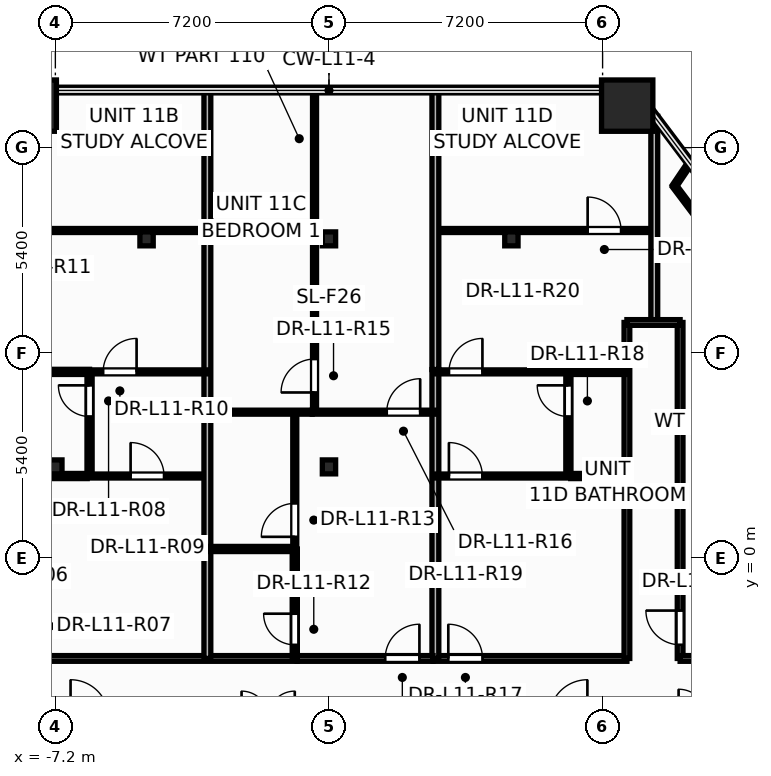
"""IFC4 building model, lengths in metres.
Left out: names, types, materials, properties, quantities, classifications, styles, units other than length and angle.
Written with IfcOpenShell. Run it as: python <this file> out.ifc"""

import sys

from ifc_helpers import new_model, si_unit, direction, frame, frame_2d, origin, origin_2d, place, context, subcontext, project, spatial, rectangle, hollow_rectangle, i_section, extrude, element, fill, save


model = new_model("IFC4")
c1 = context("Model", 3, precision=1e-05, world=origin(), true_north=direction((0.0, 1.0)))
c2 = subcontext(c1, "Body", "Model", "MODEL_VIEW")
j1 = project(units=[si_unit("LENGTHUNIT", "METRE"), si_unit("PLANEANGLEUNIT", "RADIAN")], contexts=[c1])
p1 = place(None, origin())
s1 = spatial("IfcSite", under=j1, at=p1, CompositionType="ELEMENT")
p2 = place(p1, origin())
s2 = spatial("IfcBuilding", under=s1, at=p2, CompositionType="ELEMENT")
p3 = place(p2, frame((0.0, 0.0, 45.9)))
s3 = spatial("IfcBuildingStorey", under=s2, at=p3, CompositionType="ELEMENT", Elevation=45.9)
for number, where, z_axis, x_axis in (
    (1, (7.847, 11.906, 0.0), (0.0, 0.0, 1.0), (1.0, 0.0, 0.0)),
    (2, (-7.847, 11.906, 0.0), (0.0, 0.0, 1.0), (1.0, 0.0, 0.0)),
):
    element("IfcColumn", number, at=place(p3, frame(where, z_axis=z_axis, x_axis=x_axis)), inside=s3, PredefinedType="COLUMN", context=c2, shape_type="SweptSolid", body=[
        extrude(hollow_rectangle(XDim=1.35, YDim=1.35, WallThickness=0.065, at=origin_2d()), origin(), (0.0, 0.0, 1.0), 3.6),
    ])
for number, where, z_axis, x_axis in (
    (3, (-7.2, 2.4, 0.0), (0.0, 0.0, 1.0), (1.0, 0.0, 0.0)),
    (4, (0.0, 2.4, 0.0), (0.0, 0.0, 1.0), (1.0, 0.0, 0.0)),
    (5, (7.2, 2.4, 0.0), (0.0, 0.0, 1.0), (1.0, 0.0, 0.0)),
    (6, (-4.8, 8.4, 0.0), (0.0, 0.0, 1.0), (1.0, 0.0, 0.0)),
    (7, (0.0, 8.4, 0.0), (0.0, 0.0, 1.0), (1.0, 0.0, 0.0)),
    (8, (4.8, 8.4, 0.0), (0.0, 0.0, 1.0), (1.0, 0.0, 0.0)),
):
    element("IfcColumn", number, at=place(p3, frame(where, z_axis=z_axis, x_axis=x_axis)), inside=s3, PredefinedType="COLUMN", context=c2, shape_type="SweptSolid", body=[
        extrude(i_section(OverallWidth=0.35, OverallDepth=0.367, WebThickness=0.025, FlangeThickness=0.032, at=origin_2d()), origin(), (0.0, 0.0, 1.0), 3.6),
    ])
p4 = place(p3, frame((9.24, -2.64, 0.0), z_axis=(0.0, 0.0, 1.0), x_axis=(0.0, 1.0, 0.0)))
e9 = element("IfcWall", 9, at=p4, inside=s3, PredefinedType="PARTITIONING", context=c2, shape_type="SweptSolid", body=[
    extrude(rectangle(XDim=8.84, YDim=0.15, at=frame_2d((4.42, 0.0))), origin(), (0.0, 0.0, 1.0), 2.509),
])
p5 = place(p4, frame((0.359, 0.0, 0.0)))
e10 = element("IfcOpeningElement", 10, at=p5, cuts=e9, PredefinedType="OPENING", context=c2, shape_type="SweptSolid", body=[
    extrude(rectangle(XDim=0.906, YDim=2.104, at=frame_2d((0.45, 1.052))), frame((0.0, 0.085, 0.0), z_axis=(0.0, -1.0, 0.0), x_axis=(1.0, 0.0, 0.0)), (0.0, 0.0, 1.0), 0.17),
])
p6 = place(p3, frame((-0.38, 3.84, 0.0), z_axis=(0.0, 0.0, 1.0), x_axis=(0.0, 1.0, 0.0)))
e11 = element("IfcWall", 11, at=p6, inside=s3, PredefinedType="PARTITIONING", context=c2, shape_type="SweptSolid", body=[
    extrude(rectangle(XDim=8.466, YDim=0.105, at=frame_2d((4.233, 0.0))), origin(), (0.0, 0.0, 1.0), 2.509),
])
p7 = place(p6, frame((0.518, 0.0, 0.0)))
e12 = element("IfcOpeningElement", 12, at=p7, cuts=e11, PredefinedType="OPENING", context=c2, shape_type="SweptSolid", body=[
    extrude(rectangle(XDim=0.886, YDim=2.104, at=frame_2d((0.44, 1.052))), frame((0.0, 0.062, 0.0), z_axis=(0.0, -1.0, 0.0), x_axis=(1.0, 0.0, 0.0)), (0.0, 0.0, 1.0), 0.125),
])
p8 = place(p3, frame((2.8, 8.62, 0.0), z_axis=(0.0, 0.0, 1.0), x_axis=(1.0, 0.0, 0.0)))
e13 = element("IfcWall", 13, at=p8, inside=s3, PredefinedType="PARTITIONING", context=c2, shape_type="SweptSolid", body=[
    extrude(rectangle(XDim=5.76, YDim=0.105, at=frame_2d((2.88, 0.0))), origin(), (0.0, 0.0, 1.0), 2.509),
])
p9 = place(p8, frame((4.007, 0.0, 0.0)))
e14 = element("IfcOpeningElement", 14, at=p9, cuts=e13, PredefinedType="OPENING", context=c2, shape_type="SweptSolid", body=[
    extrude(rectangle(XDim=0.886, YDim=2.104, at=frame_2d((0.44, 1.052))), frame((0.0, 0.062, 0.0), z_axis=(0.0, -1.0, 0.0), x_axis=(1.0, 0.0, 0.0)), (0.0, 0.0, 1.0), 0.125),
])
p10 = place(p3, frame((9.24, -2.64, 0.0), z_axis=(0.0, 0.0, 1.0), x_axis=(1.0, 0.0, 0.0)))
e15 = element("IfcWall", 15, at=p10, inside=s3, PredefinedType="PARTITIONING", context=c2, shape_type="SweptSolid", body=[
    extrude(rectangle(XDim=5.4, YDim=0.15, at=frame_2d((2.7, 0.0))), origin(), (0.0, 0.0, 1.0), 3.35),
])
p11 = place(p3, frame((-8.56, 8.62, 0.0), z_axis=(0.0, 0.0, 1.0), x_axis=(1.0, 0.0, 0.0)))
e16 = element("IfcWall", 16, at=p11, inside=s3, PredefinedType="PARTITIONING", context=c2, shape_type="SweptSolid", body=[
    extrude(rectangle(XDim=5.36, YDim=0.105, at=frame_2d((2.68, 0.0))), origin(), (0.0, 0.0, 1.0), 2.509),
])
p12 = place(p11, frame((0.358, 0.0, 0.0)))
e17 = element("IfcOpeningElement", 17, at=p12, cuts=e16, PredefinedType="OPENING", context=c2, shape_type="SweptSolid", body=[
    extrude(rectangle(XDim=0.886, YDim=2.104, at=frame_2d((0.44, 1.052))), frame((0.0, 0.062, 0.0), z_axis=(0.0, -1.0, 0.0), x_axis=(1.0, 0.0, 0.0)), (0.0, 0.0, 1.0), 0.125),
])
p13 = place(p3, frame((2.74, -2.64, 0.0), z_axis=(0.0, 0.0, 1.0), x_axis=(1.0, 0.0, 0.0)))
e18 = element("IfcWall", 18, at=p13, inside=s3, PredefinedType="PARTITIONING", context=c2, shape_type="SweptSolid", body=[
    extrude(rectangle(XDim=5.1, YDim=0.15, at=frame_2d((2.55, 0.0))), origin(), (0.0, 0.0, 1.0), 2.325),
])
p14 = place(p13, frame((0.4, 0.0, 0.0)))
e19 = element("IfcOpeningElement", 19, at=p14, cuts=e18, PredefinedType="OPENING", context=c2, shape_type="SweptSolid", body=[
    extrude(rectangle(XDim=0.906, YDim=2.104, at=frame_2d((0.45, 1.052))), frame((0.0, 0.085, 0.0), z_axis=(0.0, -1.0, 0.0), x_axis=(1.0, 0.0, 0.0)), (0.0, 0.0, 1.0), 0.17),
])
p15 = place(p3, frame((7.84, -2.64, 0.0), z_axis=(0.0, 0.0, 1.0), x_axis=(0.0, 1.0, 0.0)))
e20 = element("IfcWall", 20, at=p15, inside=s3, PredefinedType="PARTITIONING", context=c2, shape_type="SweptSolid", body=[
    extrude(rectangle(XDim=8.84, YDim=0.15, at=frame_2d((4.42, 0.0))), origin(), (0.0, 0.0, 1.0), 2.509),
])
p16 = place(p3, frame((2.8, -2.64, 0.0), z_axis=(0.0, 0.0, 1.0), x_axis=(0.0, 1.0, 0.0)))
e21 = element("IfcWall", 21, at=p16, inside=s3, PredefinedType="PARTITIONING", context=c2, shape_type="SweptSolid", body=[
    extrude(rectangle(XDim=7.6, YDim=0.18, at=frame_2d((3.8, 0.0))), origin(), (0.0, 0.0, 1.0), 2.325),
])
p17 = place(p3, frame((-7.84, -2.64, 0.0), z_axis=(0.0, 0.0, 1.0), x_axis=(1.0, 0.0, 0.0)))
e22 = element("IfcWall", 22, at=p17, inside=s3, PredefinedType="PARTITIONING", context=c2, shape_type="SweptSolid", body=[
    extrude(rectangle(XDim=7.0, YDim=0.15, at=frame_2d((3.5, 0.0))), origin(), (0.0, 0.0, 1.0), 2.325),
])
p18 = place(p3, frame((2.8, 4.962, 0.0), z_axis=(0.0, 0.0, 1.0), x_axis=(0.0, 1.0, 0.0)))
e23 = element("IfcWall", 23, at=p18, inside=s3, PredefinedType="PARTITIONING", context=c2, shape_type="SweptSolid", body=[
    extrude(rectangle(XDim=7.344, YDim=0.18, at=frame_2d((3.672, 0.0))), origin(), (0.0, 0.0, 1.0), 2.509),
])
p19 = place(p3, frame((-0.838, -2.64, 0.0), z_axis=(0.0, 0.0, 1.0), x_axis=(1.0, 0.0, 0.0)))
e24 = element("IfcWall", 24, at=p19, inside=s3, PredefinedType="PARTITIONING", context=c2, shape_type="SweptSolid", body=[
    extrude(rectangle(XDim=3.576, YDim=0.15, at=frame_2d((1.788, 0.0))), origin(), (0.0, 0.0, 1.0), 2.325),
])
p20 = place(p19, frame((2.318, 0.0, 0.0)))
e25 = element("IfcOpeningElement", 25, at=p20, cuts=e24, PredefinedType="OPENING", context=c2, shape_type="SweptSolid", body=[
    extrude(rectangle(XDim=0.906, YDim=2.104, at=frame_2d((0.45, 1.052))), frame((0.0, 0.085, 0.0), z_axis=(0.0, -1.0, 0.0), x_axis=(1.0, 0.0, 0.0)), (0.0, 0.0, 1.0), 0.17),
])
p21 = place(p3, frame((-3.2, 3.8, 0.0), z_axis=(0.0, 0.0, 1.0), x_axis=(0.0, 1.0, 0.0)))
e26 = element("IfcWall", 26, at=p21, inside=s3, PredefinedType="PARTITIONING", context=c2, shape_type="SweptSolid", body=[
    extrude(rectangle(XDim=8.506, YDim=0.18, at=frame_2d((4.253, 0.0))), origin(), (0.0, 0.0, 1.0), 2.509),
])
p22 = place(p3, frame((-0.9, 0.24, 0.0), z_axis=(0.0, 0.0, 1.0), x_axis=(0.0, 1.0, 0.0)))
e27 = element("IfcWall", 27, at=p22, inside=s3, PredefinedType="PARTITIONING", context=c2, shape_type="SweptSolid", body=[
    extrude(rectangle(XDim=3.6, YDim=0.105, at=frame_2d((1.8, 0.0))), origin(), (0.0, 0.0, 1.0), 2.325),
])
p23 = place(p22, frame((0.32, 0.0, 0.0)))
e28 = element("IfcOpeningElement", 28, at=p23, cuts=e27, PredefinedType="OPENING", context=c2, shape_type="SweptSolid", body=[
    extrude(rectangle(XDim=0.886, YDim=2.104, at=frame_2d((0.44, 1.052))), frame((0.0, 0.062, 0.0), z_axis=(0.0, -1.0, 0.0), x_axis=(1.0, 0.0, 0.0)), (0.0, 0.0, 1.0), 0.125),
])
p24 = place(p3, frame((2.8, 2.16, 0.0), z_axis=(0.0, 0.0, 1.0), x_axis=(1.0, 0.0, 0.0)))
e29 = element("IfcWall", 29, at=p24, inside=s3, PredefinedType="PARTITIONING", context=c2, shape_type="SweptSolid", body=[
    extrude(rectangle(XDim=3.56, YDim=0.105, at=frame_2d((1.78, 0.0))), origin(), (0.0, 0.0, 1.0), 2.325),
])
p25 = place(p24, frame((0.356, 0.0, 0.0)))
e30 = element("IfcOpeningElement", 30, at=p25, cuts=e29, PredefinedType="OPENING", context=c2, shape_type="SweptSolid", body=[
    extrude(rectangle(XDim=0.886, YDim=2.104, at=frame_2d((0.44, 1.052))), frame((0.0, 0.062, 0.0), z_axis=(0.0, -1.0, 0.0), x_axis=(1.0, 0.0, 0.0)), (0.0, 0.0, 1.0), 0.125),
])
p26 = place(p3, frame((2.8, 4.9, 0.0), z_axis=(0.0, 0.0, 1.0), x_axis=(1.0, 0.0, 0.0)))
e31 = element("IfcWall", 31, at=p26, inside=s3, PredefinedType="PARTITIONING", context=c2, shape_type="SweptSolid", body=[
    extrude(rectangle(XDim=3.5, YDim=0.105, at=frame_2d((1.75, 0.0))), origin(), (0.0, 0.0, 1.0), 2.509),
])
p27 = place(p26, frame((0.358, 0.0, 0.0)))
e32 = element("IfcOpeningElement", 32, at=p27, cuts=e31, PredefinedType="OPENING", context=c2, shape_type="SweptSolid", body=[
    extrude(rectangle(XDim=0.886, YDim=2.104, at=frame_2d((0.44, 1.052))), frame((0.0, 0.062, 0.0), z_axis=(0.0, -1.0, 0.0), x_axis=(1.0, 0.0, 0.0)), (0.0, 0.0, 1.0), 0.125),
])
p28 = place(p3, frame((-0.44, 3.84, 0.0), z_axis=(0.0, 0.0, 1.0), x_axis=(1.0, 0.0, 0.0)))
e33 = element("IfcWall", 33, at=p28, inside=s3, PredefinedType="PARTITIONING", context=c2, shape_type="SweptSolid", body=[
    extrude(rectangle(XDim=3.24, YDim=0.105, at=frame_2d((1.62, 0.0))), origin(), (0.0, 0.0, 1.0), 2.325),
])
p29 = place(p28, frame((1.96, 0.0, 0.0)))
e34 = element("IfcOpeningElement", 34, at=p29, cuts=e33, PredefinedType="OPENING", context=c2, shape_type="SweptSolid", body=[
    extrude(rectangle(XDim=0.886, YDim=2.104, at=frame_2d((0.44, 1.052))), frame((0.0, 0.062, 0.0), z_axis=(0.0, -1.0, 0.0), x_axis=(1.0, 0.0, 0.0)), (0.0, 0.0, 1.0), 0.125),
])
p30 = place(p3, frame((-6.36, 2.16, 0.0), z_axis=(0.0, 0.0, 1.0), x_axis=(1.0, 0.0, 0.0)))
e35 = element("IfcWall", 35, at=p30, inside=s3, PredefinedType="PARTITIONING", context=c2, shape_type="SweptSolid", body=[
    extrude(rectangle(XDim=3.16, YDim=0.105, at=frame_2d((1.58, 0.0))), origin(), (0.0, 0.0, 1.0), 2.325),
])
p31 = place(p30, frame((1.14, 0.0, 0.0)))
e36 = element("IfcOpeningElement", 36, at=p31, cuts=e35, PredefinedType="OPENING", context=c2, shape_type="SweptSolid", body=[
    extrude(rectangle(XDim=0.886, YDim=2.104, at=frame_2d((0.44, 1.052))), frame((0.0, 0.062, 0.0), z_axis=(0.0, -1.0, 0.0), x_axis=(1.0, 0.0, 0.0)), (0.0, 0.0, 1.0), 0.125),
])
p32 = place(p3, frame((-6.3, 4.9, 0.0), z_axis=(0.0, 0.0, 1.0), x_axis=(1.0, 0.0, 0.0)))
e37 = element("IfcWall", 37, at=p32, inside=s3, PredefinedType="PARTITIONING", context=c2, shape_type="SweptSolid", body=[
    extrude(rectangle(XDim=3.1, YDim=0.105, at=frame_2d((1.55, 0.0))), origin(), (0.0, 0.0, 1.0), 2.509),
])
p33 = place(p32, frame((0.358, 0.0, 0.0)))
e38 = element("IfcOpeningElement", 38, at=p33, cuts=e37, PredefinedType="OPENING", context=c2, shape_type="SweptSolid", body=[
    extrude(rectangle(XDim=0.886, YDim=2.104, at=frame_2d((0.44, 1.052))), frame((0.0, 0.062, 0.0), z_axis=(0.0, -1.0, 0.0), x_axis=(1.0, 0.0, 0.0)), (0.0, 0.0, 1.0), 0.125),
])
p34 = place(p3, frame((8.56, 6.2, 0.0), z_axis=(0.0, 0.0, 1.0), x_axis=(0.0, 1.0, 0.0)))
e39 = element("IfcWall", 39, at=p34, inside=s3, PredefinedType="PARTITIONING", context=c2, shape_type="SweptSolid", body=[
    extrude(rectangle(XDim=5.425, YDim=0.18, at=frame_2d((2.712, 0.0))), origin(), (0.0, 0.0, 1.0), 2.509),
])
p35 = place(p3, frame((-3.2, -2.64, 0.0), z_axis=(0.0, 0.0, 1.0), x_axis=(0.0, 1.0, 0.0)))
e40 = element("IfcWall", 40, at=p35, inside=s3, PredefinedType="PARTITIONING", context=c2, shape_type="SweptSolid", body=[
    extrude(rectangle(XDim=6.438, YDim=0.18, at=frame_2d((3.219, 0.0))), origin(), (0.0, 0.0, 1.0), 2.325),
])
p36 = place(p3, frame((-0.9, -2.64, 0.0), z_axis=(0.0, 0.0, 1.0), x_axis=(0.0, 1.0, 0.0)))
e41 = element("IfcWall", 41, at=p36, inside=s3, PredefinedType="PARTITIONING", context=c2, shape_type="SweptSolid", body=[
    extrude(rectangle(XDim=2.88, YDim=0.135, at=frame_2d((1.44, 0.0))), origin(), (0.0, 0.0, 1.0), 3.35),
])
p37 = place(p36, frame((0.357, 0.0, 0.0)))
e42 = element("IfcOpeningElement", 42, at=p37, cuts=e41, PredefinedType="OPENING", context=c2, shape_type="SweptSolid", body=[
    extrude(rectangle(XDim=0.826, YDim=2.104, at=frame_2d((0.41, 1.052))), frame((0.0, 0.078, 0.0), z_axis=(0.0, -1.0, 0.0), x_axis=(1.0, 0.0, 0.0)), (0.0, 0.0, 1.0), 0.155),
])
p38 = place(p3, frame((-6.3, 2.16, 0.0), z_axis=(0.0, 0.0, 1.0), x_axis=(0.0, 1.0, 0.0)))
e43 = element("IfcWall", 43, at=p38, inside=s3, PredefinedType="PARTITIONING", context=c2, shape_type="SweptSolid", body=[
    extrude(rectangle(XDim=2.74, YDim=0.135, at=frame_2d((1.37, 0.0))), origin(), (0.0, 0.0, 1.0), 2.325),
])
p39 = place(p38, frame((1.566, 0.0, 0.0)))
e44 = element("IfcOpeningElement", 44, at=p39, cuts=e43, PredefinedType="OPENING", context=c2, shape_type="SweptSolid", body=[
    extrude(rectangle(XDim=0.826, YDim=2.104, at=frame_2d((0.41, 1.052))), frame((0.0, 0.078, 0.0), z_axis=(0.0, -1.0, 0.0), x_axis=(1.0, 0.0, 0.0)), (0.0, 0.0, 1.0), 0.155),
])
p40 = place(p3, frame((6.3, 2.16, 0.0), z_axis=(0.0, 0.0, 1.0), x_axis=(0.0, 1.0, 0.0)))
e45 = element("IfcWall", 45, at=p40, inside=s3, PredefinedType="PARTITIONING", context=c2, shape_type="SweptSolid", body=[
    extrude(rectangle(XDim=2.74, YDim=0.135, at=frame_2d((1.37, 0.0))), origin(), (0.0, 0.0, 1.0), 2.325),
])
p41 = place(p40, frame((1.566, 0.0, 0.0)))
e46 = element("IfcOpeningElement", 46, at=p41, cuts=e45, PredefinedType="OPENING", context=c2, shape_type="SweptSolid", body=[
    extrude(rectangle(XDim=0.826, YDim=2.104, at=frame_2d((0.41, 1.052))), frame((0.0, 0.078, 0.0), z_axis=(0.0, -1.0, 0.0), x_axis=(1.0, 0.0, 0.0)), (0.0, 0.0, 1.0), 0.155),
])
p42 = place(p3, frame((-3.2, 0.24, 0.0), z_axis=(0.0, 0.0, 1.0), x_axis=(1.0, 0.0, 0.0)))
e47 = element("IfcWall", 47, at=p42, inside=s3, PredefinedType="PARTITIONING", context=c2, shape_type="SweptSolid", body=[
    extrude(rectangle(XDim=2.3, YDim=0.135, at=frame_2d((1.15, 0.0))), origin(), (0.0, 0.0, 1.0), 3.35),
])
p43 = place(p3, frame((-3.2, 3.84, 0.0), z_axis=(0.0, 0.0, 1.0), x_axis=(1.0, 0.0, 0.0)))
e48 = element("IfcWall", 48, at=p43, inside=s3, PredefinedType="PARTITIONING", context=c2, shape_type="SweptSolid", body=[
    extrude(rectangle(XDim=2.758, YDim=0.105, at=frame_2d((1.379, 0.0))), origin(), (0.0, 0.0, 1.0), 2.919),
])
p44 = place(p3, frame((10.421, 8.023, 0.0), z_axis=(0.0, 0.0, 1.0), x_axis=(-0.601604540601, 0.798794076548, 0.0)))
e49 = element("IfcWall", 49, at=p44, inside=s3, PredefinedType="PARTITIONING", context=c2, shape_type="SweptSolid", body=[
    extrude(rectangle(XDim=2.214, YDim=0.12, at=frame_2d((1.107, 0.0))), origin(), (0.0, 0.0, 1.0), 3.35),
])
for number, where, z_axis, x_axis in (
    (50, (-7.84, 2.16, 0.0), (0.0, 0.0, 1.0), (1.0, 0.0, 0.0)),
    (51, (6.362, 2.16, 0.0), (0.0, 0.0, 1.0), (1.0, 0.0, 0.0)),
):
    element("IfcWall", number, at=place(p3, frame(where, z_axis=z_axis, x_axis=x_axis)), inside=s3, PredefinedType="PARTITIONING", context=c2, shape_type="SweptSolid", body=[
        extrude(rectangle(XDim=1.478, YDim=0.135, at=frame_2d((0.739, 0.0))), origin(), (0.0, 0.0, 1.0), 2.325),
    ])
for number, where, z_axis, x_axis in (
    (52, (-7.84, 4.9, 0.0), (0.0, 0.0, 1.0), (1.0, 0.0, 0.0)),
    (53, (6.3, 4.9, 0.0), (0.0, 0.0, 1.0), (1.0, 0.0, 0.0)),
):
    element("IfcWall", number, at=place(p3, frame(where, z_axis=z_axis, x_axis=x_axis)), inside=s3, PredefinedType="PARTITIONING", context=c2, shape_type="SweptSolid", body=[
        extrude(rectangle(XDim=1.54, YDim=0.135, at=frame_2d((0.77, 0.0))), origin(), (0.0, 0.0, 1.0), 2.509),
    ])
p45 = place(p3, frame((7.84, 6.2, 0.0), z_axis=(0.0, 0.0, 1.0), x_axis=(1.0, 0.0, 0.0)))
e54 = element("IfcWall", 54, at=p45, inside=s3, PredefinedType="PARTITIONING", context=c2, shape_type="SweptSolid", body=[
    extrude(rectangle(XDim=1.4, YDim=0.15, at=frame_2d((0.7, 0.0))), origin(), (0.0, 0.0, 1.0), 3.35),
])
p46 = place(p3, frame((9.089, 9.792, 0.0), z_axis=(0.0, 0.0, 1.0), x_axis=(0.559064577703, 0.82912411493, 0.0)))
e55 = element("IfcWall", 55, at=p46, inside=s3, PredefinedType="PARTITIONING", context=c2, shape_type="SweptSolid", body=[
    extrude(rectangle(XDim=0.709, YDim=0.12, at=frame_2d((0.354, 0.0))), origin(), (0.0, 0.0, 1.0), 2.713),
])
p47 = place(p39, origin())
e56 = element("IfcDoor", 56, at=p47, inside=s3, OperationType="SINGLE_SWING_RIGHT", PredefinedType="DOOR", context=c2, shape_type="SweptSolid", body=[
    extrude(rectangle(XDim=0.82, YDim=2.1, at=frame_2d((0.41, 1.05))), frame((0.0, 0.025, 0.0), z_axis=(0.0, -1.0, 0.0), x_axis=(1.0, 0.0, 0.0)), (0.0, 0.0, 1.0), 0.05),
])
fill(e44, e56)
p48 = place(p31, origin())
e57 = element("IfcDoor", 57, at=p48, inside=s3, OperationType="SINGLE_SWING_LEFT", PredefinedType="DOOR", context=c2, shape_type="SweptSolid", body=[
    extrude(rectangle(XDim=0.88, YDim=2.1, at=frame_2d((0.44, 1.05))), frame((0.0, 0.025, 0.0), z_axis=(0.0, -1.0, 0.0), x_axis=(1.0, 0.0, 0.0)), (0.0, 0.0, 1.0), 0.05),
])
fill(e36, e57)
p49 = place(p33, origin())
e58 = element("IfcDoor", 58, at=p49, inside=s3, OperationType="SINGLE_SWING_RIGHT", PredefinedType="DOOR", context=c2, shape_type="SweptSolid", body=[
    extrude(rectangle(XDim=0.88, YDim=2.1, at=frame_2d((0.44, 1.05))), frame((0.0, 0.025, 0.0), z_axis=(0.0, -1.0, 0.0), x_axis=(1.0, 0.0, 0.0)), (0.0, 0.0, 1.0), 0.05),
])
fill(e38, e58)
p50 = place(p37, origin())
e59 = element("IfcDoor", 59, at=p50, inside=s3, OperationType="SINGLE_SWING_RIGHT", PredefinedType="DOOR", context=c2, shape_type="SweptSolid", body=[
    extrude(rectangle(XDim=0.82, YDim=2.1, at=frame_2d((0.41, 1.05))), frame((0.0, 0.025, 0.0), z_axis=(0.0, -1.0, 0.0), x_axis=(1.0, 0.0, 0.0)), (0.0, 0.0, 1.0), 0.05),
])
fill(e42, e59)
p51 = place(p23, origin())
e60 = element("IfcDoor", 60, at=p51, inside=s3, OperationType="SINGLE_SWING_LEFT", PredefinedType="DOOR", context=c2, shape_type="SweptSolid", body=[
    extrude(rectangle(XDim=0.88, YDim=2.1, at=frame_2d((0.44, 1.05))), frame((0.0, 0.025, 0.0), z_axis=(0.0, -1.0, 0.0), x_axis=(1.0, 0.0, 0.0)), (0.0, 0.0, 1.0), 0.05),
])
fill(e28, e60)
p52 = place(p20, origin())
e61 = element("IfcDoor", 61, at=p52, inside=s3, OperationType="SINGLE_SWING_RIGHT", PredefinedType="DOOR", context=c2, shape_type="SweptSolid", body=[
    extrude(rectangle(XDim=0.9, YDim=2.1, at=frame_2d((0.45, 1.05))), frame((0.0, 0.025, 0.0), z_axis=(0.0, -1.0, 0.0), x_axis=(1.0, 0.0, 0.0)), (0.0, 0.0, 1.0), 0.05),
])
fill(e25, e61)
p53 = place(p7, origin())
e62 = element("IfcDoor", 62, at=p53, inside=s3, OperationType="SINGLE_SWING_LEFT", PredefinedType="DOOR", context=c2, shape_type="SweptSolid", body=[
    extrude(rectangle(XDim=0.88, YDim=2.1, at=frame_2d((0.44, 1.05))), frame((0.0, 0.025, 0.0), z_axis=(0.0, -1.0, 0.0), x_axis=(1.0, 0.0, 0.0)), (0.0, 0.0, 1.0), 0.05),
])
fill(e12, e62)
p54 = place(p29, origin())
e63 = element("IfcDoor", 63, at=p54, inside=s3, OperationType="SINGLE_SWING_RIGHT", PredefinedType="DOOR", context=c2, shape_type="SweptSolid", body=[
    extrude(rectangle(XDim=0.88, YDim=2.1, at=frame_2d((0.44, 1.05))), frame((0.0, 0.025, 0.0), z_axis=(0.0, -1.0, 0.0), x_axis=(1.0, 0.0, 0.0)), (0.0, 0.0, 1.0), 0.05),
])
fill(e34, e63)
p55 = place(p14, origin())
e64 = element("IfcDoor", 64, at=p55, inside=s3, OperationType="SINGLE_SWING_LEFT", PredefinedType="DOOR", context=c2, shape_type="SweptSolid", body=[
    extrude(rectangle(XDim=0.9, YDim=2.1, at=frame_2d((0.45, 1.05))), frame((0.0, 0.025, 0.0), z_axis=(0.0, -1.0, 0.0), x_axis=(1.0, 0.0, 0.0)), (0.0, 0.0, 1.0), 0.05),
])
fill(e19, e64)
p56 = place(p41, origin())
e65 = element("IfcDoor", 65, at=p56, inside=s3, OperationType="SINGLE_SWING_RIGHT", PredefinedType="DOOR", context=c2, shape_type="SweptSolid", body=[
    extrude(rectangle(XDim=0.82, YDim=2.1, at=frame_2d((0.41, 1.05))), frame((0.0, 0.025, 0.0), z_axis=(0.0, -1.0, 0.0), x_axis=(1.0, 0.0, 0.0)), (0.0, 0.0, 1.0), 0.05),
])
fill(e46, e65)
p57 = place(p25, origin())
e66 = element("IfcDoor", 66, at=p57, inside=s3, OperationType="SINGLE_SWING_LEFT", PredefinedType="DOOR", context=c2, shape_type="SweptSolid", body=[
    extrude(rectangle(XDim=0.88, YDim=2.1, at=frame_2d((0.44, 1.05))), frame((0.0, 0.025, 0.0), z_axis=(0.0, -1.0, 0.0), x_axis=(1.0, 0.0, 0.0)), (0.0, 0.0, 1.0), 0.05),
])
fill(e30, e66)
p58 = place(p27, origin())
e67 = element("IfcDoor", 67, at=p58, inside=s3, OperationType="SINGLE_SWING_RIGHT", PredefinedType="DOOR", context=c2, shape_type="SweptSolid", body=[
    extrude(rectangle(XDim=0.88, YDim=2.1, at=frame_2d((0.44, 1.05))), frame((0.0, 0.025, 0.0), z_axis=(0.0, -1.0, 0.0), x_axis=(1.0, 0.0, 0.0)), (0.0, 0.0, 1.0), 0.05),
])
fill(e32, e67)
p59 = place(p9, origin())
e68 = element("IfcDoor", 68, at=p59, inside=s3, OperationType="SINGLE_SWING_LEFT", PredefinedType="DOOR", context=c2, shape_type="SweptSolid", body=[
    extrude(rectangle(XDim=0.88, YDim=2.1, at=frame_2d((0.44, 1.05))), frame((0.0, 0.025, 0.0), z_axis=(0.0, -1.0, 0.0), x_axis=(1.0, 0.0, 0.0)), (0.0, 0.0, 1.0), 0.05),
])
fill(e14, e68)
p60 = place(p5, origin())
e69 = element("IfcDoor", 69, at=p60, inside=s3, OperationType="SINGLE_SWING_RIGHT", PredefinedType="DOOR", context=c2, shape_type="SweptSolid", body=[
    extrude(rectangle(XDim=0.9, YDim=2.1, at=frame_2d((0.45, 1.05))), frame((0.0, 0.025, 0.0), z_axis=(0.0, -1.0, 0.0), x_axis=(1.0, 0.0, 0.0)), (0.0, 0.0, 1.0), 0.05),
])
fill(e10, e69)
save(model, sys.argv[1])
